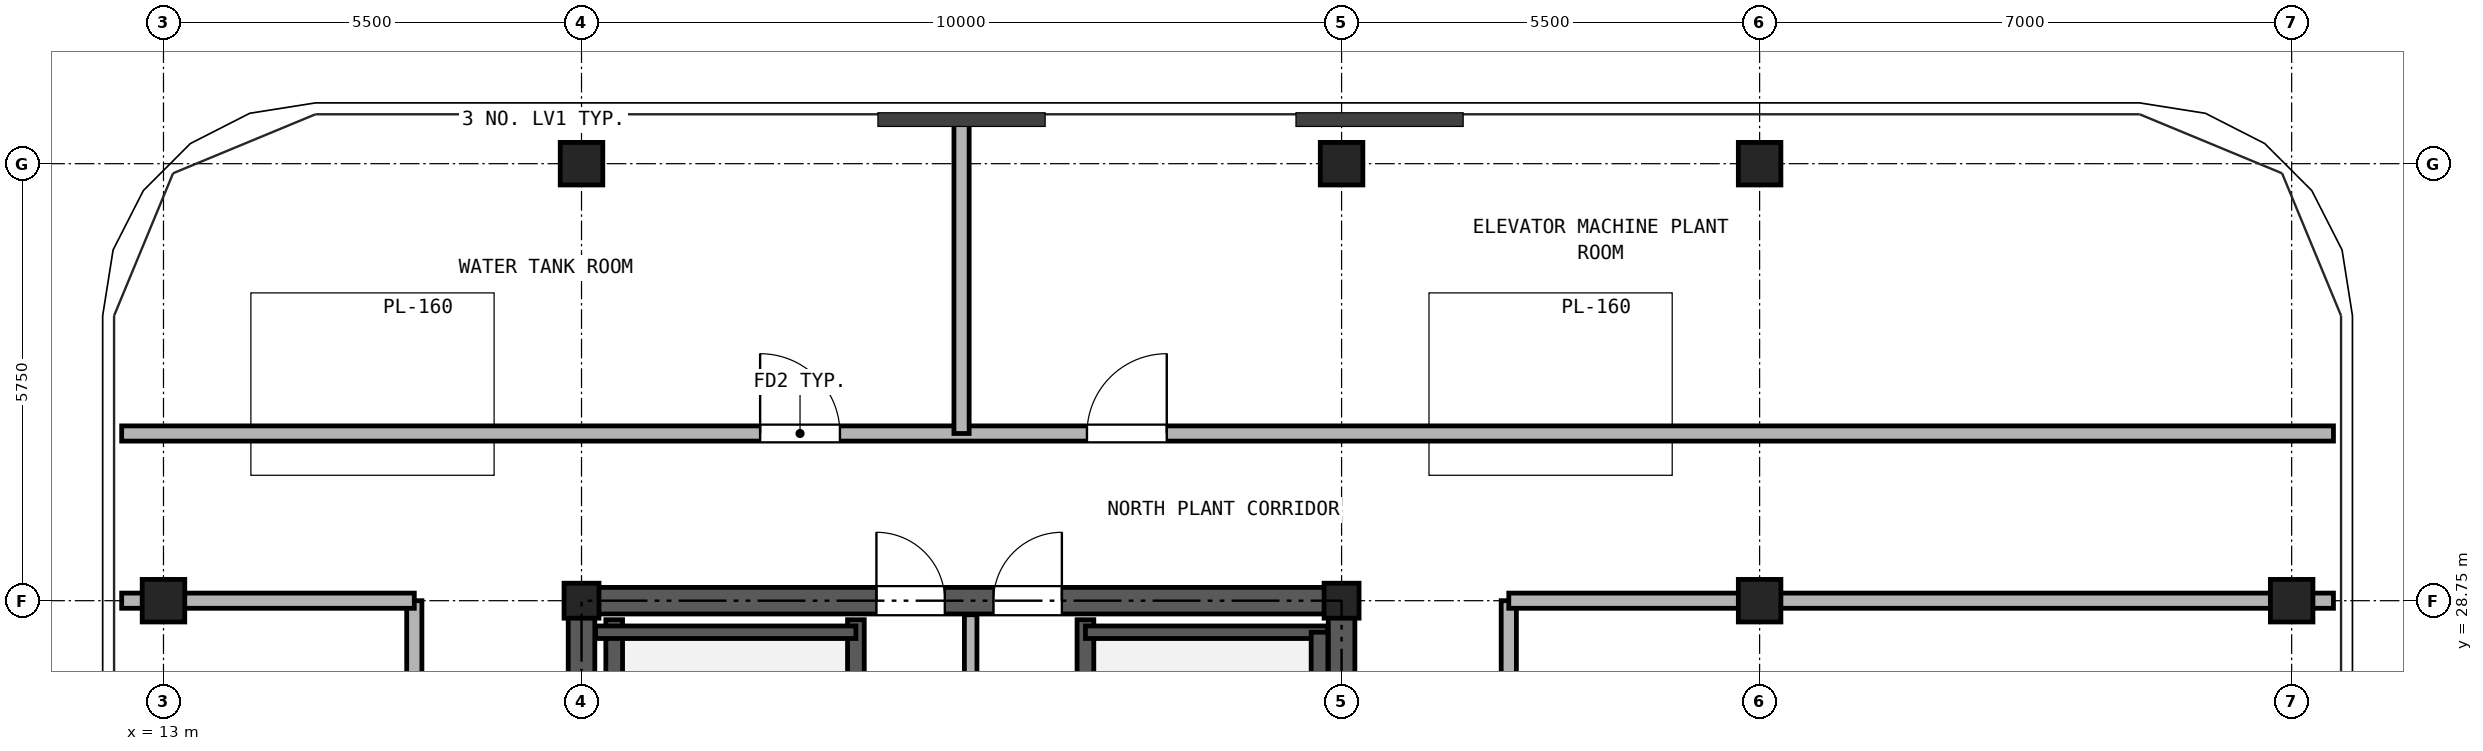
"""IFC4 building model, lengths in metres.
Left out: names, types, materials, properties, quantities, classifications, styles, units other than length and angle.
Written with IfcOpenShell. Run it as: python <this file> out.ifc"""

import sys

from ifc_helpers import new_model, si_unit, direction, frame, frame_2d, origin, origin_2d, place, context, subcontext, project, spatial, rectangle, hollow_rectangle, extrude, source, transform, mapped, element, fill, save


model = new_model("IFC4")
c1 = context("Model", 3, precision=1e-05, world=origin(), true_north=direction((0.0, 1.0)))
c2 = subcontext(c1, "Body", "Model", "MODEL_VIEW")
j1 = project(units=[si_unit("LENGTHUNIT", "METRE"), si_unit("PLANEANGLEUNIT", "RADIAN")], contexts=[c1])
p1 = place(None, origin())
s1 = spatial("IfcSite", under=j1, at=p1, CompositionType="ELEMENT")
p2 = place(p1, origin())
s2 = spatial("IfcBuilding", under=s1, at=p2, CompositionType="ELEMENT")
p3 = place(p2, frame((0.0, 0.0, 282.1)))
s3 = spatial("IfcBuildingStorey", under=s2, at=p3, CompositionType="ELEMENT", Elevation=282.1)
m1 = source(origin(), c2, "Body", "SweptSolid", [
    extrude(hollow_rectangle(XDim=0.56, YDim=0.56, WallThickness=0.03, at=origin_2d()), origin(), (0.0, 0.0, 1.0), 3.38),
])
for number, where, z_axis, x_axis in (
    (1, (18.5, 34.5, 0.0), (0.0, 0.0, 1.0), (1.0, 0.0, 0.0)),
    (2, (28.5, 34.5, 0.0), (0.0, 0.0, 1.0), (1.0, 0.0, 0.0)),
    (3, (34.0, 34.5, 0.0), (0.0, 0.0, 1.0), (1.0, 0.0, 0.0)),
    (4, (13.0, 28.75, 0.0), (0.0, 0.0, 1.0), (1.0, 0.0, 0.0)),
    (5, (41.0, 28.75, 0.0), (0.0, 0.0, 1.0), (1.0, 0.0, 0.0)),
):
    element("IfcColumn", number, at=place(p3, frame(where, z_axis=z_axis, x_axis=x_axis)), inside=s3, PredefinedType="COLUMN", context=c2, shape_type="MappedRepresentation", body=[
        mapped(m1, transform((0.0, 0.0, 0.0), x_axis=(1.0, 0.0, 0.0), y_axis=(0.0, 1.0, 0.0), z_axis=(0.0, 0.0, 1.0), scale=1.0)),
    ])
m2 = source(origin(), c2, "Body", "SweptSolid", [
    extrude(hollow_rectangle(XDim=0.46, YDim=0.46, WallThickness=0.025, at=origin_2d()), origin(), (0.0, 0.0, 1.0), 3.38),
])
for number, where, z_axis, x_axis in (
    (6, (18.5, 28.75, 0.0), (0.0, 0.0, 1.0), (1.0, 0.0, 0.0)),
    (7, (28.5, 28.75, 0.0), (0.0, 0.0, 1.0), (1.0, 0.0, 0.0)),
):
    element("IfcColumn", number, at=place(p3, frame(where, z_axis=z_axis, x_axis=x_axis)), inside=s3, PredefinedType="COLUMN", context=c2, shape_type="MappedRepresentation", body=[
        mapped(m2, transform((0.0, 0.0, 0.0), x_axis=(1.0, 0.0, 0.0), y_axis=(0.0, 1.0, 0.0), z_axis=(0.0, 0.0, 1.0), scale=1.0)),
    ])
p4 = place(p3, frame((34.0, 28.75, 0.0), z_axis=(0.0, 0.0, 1.0), x_axis=(1.0, 0.0, 0.0)))
e8 = element("IfcColumn", 8, at=p4, inside=s3, PredefinedType="COLUMN", context=c2, shape_type="MappedRepresentation", body=[
    mapped(m1, transform((0.0, 0.0, 0.0), x_axis=(1.0, 0.0, 0.0), y_axis=(0.0, 1.0, 0.0), z_axis=(0.0, 0.0, 1.0), scale=1.0)),
])
p5 = place(p3, frame((18.325, 28.75, 0.0), z_axis=(0.0, 0.0, 1.0), x_axis=(1.0, 0.0, 0.0)))
e9 = element("IfcWall", 9, at=p5, inside=s3, PredefinedType="SHEAR", context=c2, shape_type="SweptSolid", body=[
    extrude(rectangle(XDim=10.35, YDim=0.35, at=frame_2d((5.175, 0.0))), origin(), (0.0, 0.0, 1.0), 3.38),
])
p6 = place(p5, frame((4.055, 0.0, 0.0)))
e10 = element("IfcOpeningElement", 10, at=p6, cuts=e9, PredefinedType="OPENING", context=c2, shape_type="SweptSolid", body=[
    extrude(rectangle(XDim=0.9, YDim=2.05, at=frame_2d((0.45, 1.025))), frame((0.0, 0.185, 0.0), z_axis=(0.0, -1.0, 0.0), x_axis=(1.0, 0.0, 0.0)), (0.0, 0.0, 1.0), 0.37),
])
p7 = place(p5, frame((5.595, 0.0, 0.0)))
e11 = element("IfcOpeningElement", 11, at=p7, cuts=e9, PredefinedType="OPENING", context=c2, shape_type="SweptSolid", body=[
    extrude(rectangle(XDim=0.9, YDim=2.05, at=frame_2d((0.45, 1.025))), frame((0.0, 0.185, 0.0), z_axis=(0.0, -1.0, 0.0), x_axis=(1.0, 0.0, 0.0)), (0.0, 0.0, 1.0), 0.37),
])
p8 = place(p3, frame((18.5, 11.675, 0.0), z_axis=(0.0, 0.0, 1.0), x_axis=(0.0, 1.0, 0.0)))
e12 = element("IfcWall", 12, at=p8, inside=s3, PredefinedType="SHEAR", context=c2, shape_type="SweptSolid", body=[
    extrude(rectangle(XDim=16.9, YDim=0.35, at=frame_2d((8.45, 0.0))), origin(), (0.0, 0.0, 1.0), 3.38),
])
p9 = place(p8, frame((7.475, 0.0, 0.0)))
e13 = element("IfcOpeningElement", 13, at=p9, cuts=e12, PredefinedType="OPENING", context=c2, shape_type="SweptSolid", body=[
    extrude(rectangle(XDim=1.15, YDim=2.2, at=frame_2d((0.575, 1.1))), frame((0.0, 0.185, 0.0), z_axis=(0.0, -1.0, 0.0), x_axis=(1.0, 0.0, 0.0)), (0.0, 0.0, 1.0), 0.37),
])
p10 = place(p3, frame((28.5, 11.675, 0.0), z_axis=(0.0, 0.0, 1.0), x_axis=(0.0, 1.0, 0.0)))
e14 = element("IfcWall", 14, at=p10, inside=s3, PredefinedType="SHEAR", context=c2, shape_type="SweptSolid", body=[
    extrude(rectangle(XDim=16.9, YDim=0.35, at=frame_2d((8.45, 0.0))), origin(), (0.0, 0.0, 1.0), 3.38),
])
p11 = place(p10, frame((7.475, 0.0, 0.0)))
e15 = element("IfcOpeningElement", 15, at=p11, cuts=e14, PredefinedType="OPENING", context=c2, shape_type="SweptSolid", body=[
    extrude(rectangle(XDim=1.15, YDim=2.2, at=frame_2d((0.575, 1.1))), frame((0.0, 0.185, 0.0), z_axis=(0.0, -1.0, 0.0), x_axis=(1.0, 0.0, 0.0)), (0.0, 0.0, 1.0), 0.37),
])
for number, where, z_axis, x_axis in (
    (16, (18.93, 21.39, 0.0), (0.0, 0.0, 1.0), (0.0, 1.0, 0.0)),
    (17, (22.11, 21.39, 0.0), (0.0, 0.0, 1.0), (0.0, 1.0, 0.0)),
    (18, (25.13, 21.39, 0.0), (0.0, 0.0, 1.0), (0.0, 1.0, 0.0)),
):
    element("IfcWall", number, at=place(p3, frame(where, z_axis=z_axis, x_axis=x_axis)), inside=s3, PredefinedType="SOLIDWALL", context=c2, shape_type="SweptSolid", body=[
        extrude(rectangle(XDim=7.11, YDim=0.22, at=frame_2d((3.555, 0.0))), origin(), (0.0, 0.0, 1.0), 3.38),
    ])
p12 = place(p3, frame((18.685, 28.335, 0.0), z_axis=(0.0, 0.0, 1.0), x_axis=(1.0, 0.0, 0.0)))
e19 = element("IfcWall", 19, at=p12, inside=s3, PredefinedType="PARTITIONING", context=c2, shape_type="SweptSolid", body=[
    extrude(rectangle(XDim=3.425, YDim=0.165, at=frame_2d((1.712, 0.0))), origin(), (0.0, 0.0, 1.0), 3.38),
])
p13 = place(p3, frame((25.13, 28.335, 0.0), z_axis=(0.0, 0.0, 1.0), x_axis=(1.0, 0.0, 0.0)))
e20 = element("IfcWall", 20, at=p13, inside=s3, PredefinedType="PARTITIONING", context=c2, shape_type="SweptSolid", body=[
    extrude(rectangle(XDim=3.185, YDim=0.165, at=frame_2d((1.593, 0.0))), origin(), (0.0, 0.0, 1.0), 3.38),
])
p14 = place(p3, frame((28.21, 21.39, 0.0), z_axis=(0.0, 0.0, 1.0), x_axis=(0.0, 1.0, 0.0)))
e21 = element("IfcWall", 21, at=p14, inside=s3, PredefinedType="SOLIDWALL", context=c2, shape_type="SweptSolid", body=[
    extrude(rectangle(XDim=6.945, YDim=0.22, at=frame_2d((3.473, 0.0))), origin(), (0.0, 0.0, 1.0), 3.38),
])
p15 = place(p3, frame((23.62, 24.4, 0.0), z_axis=(0.0, 0.0, 1.0), x_axis=(0.0, 1.0, 0.0)))
e22 = element("IfcWall", 22, at=p15, inside=s3, PredefinedType="PARTITIONING", context=c2, shape_type="SweptSolid", body=[
    extrude(rectangle(XDim=4.165, YDim=0.165, at=frame_2d((2.083, 0.0))), origin(), (0.0, 0.0, 1.0), 3.38),
])
p16 = place(p3, frame((12.45, 30.95, 0.0), z_axis=(0.0, 0.0, 1.0), x_axis=(1.0, 0.0, 0.0)))
e23 = element("IfcWall", 23, at=p16, inside=s3, PredefinedType="PARTITIONING", context=c2, shape_type="SweptSolid", body=[
    extrude(rectangle(XDim=29.1, YDim=0.2, at=frame_2d((14.55, 0.0))), origin(), (0.0, 0.0, 1.0), 3.38),
])
p17 = place(p16, frame((8.4, 0.0, 0.0)))
e24 = element("IfcOpeningElement", 24, at=p17, cuts=e23, PredefinedType="OPENING", context=c2, shape_type="SweptSolid", body=[
    extrude(rectangle(XDim=1.05, YDim=2.15, at=frame_2d((0.525, 1.075))), frame((0.0, 0.11, 0.0), z_axis=(0.0, -1.0, 0.0), x_axis=(1.0, 0.0, 0.0)), (0.0, 0.0, 1.0), 0.22),
])
p18 = place(p16, frame((12.7, 0.0, 0.0)))
e25 = element("IfcOpeningElement", 25, at=p18, cuts=e23, PredefinedType="OPENING", context=c2, shape_type="SweptSolid", body=[
    extrude(rectangle(XDim=1.05, YDim=2.15, at=frame_2d((0.525, 1.075))), frame((0.0, 0.11, 0.0), z_axis=(0.0, -1.0, 0.0), x_axis=(1.0, 0.0, 0.0)), (0.0, 0.0, 1.0), 0.22),
])
p19 = place(p3, frame((16.3, 8.9, 0.0), z_axis=(0.0, 0.0, 1.0), x_axis=(0.0, 1.0, 0.0)))
e26 = element("IfcWall", 26, at=p19, inside=s3, PredefinedType="PARTITIONING", context=c2, shape_type="SweptSolid", body=[
    extrude(rectangle(XDim=19.85, YDim=0.2, at=frame_2d((9.925, 0.0))), origin(), (0.0, 0.0, 1.0), 3.38),
])
p20 = place(p19, frame((4.55, 0.0, 0.0)))
e27 = element("IfcOpeningElement", 27, at=p20, cuts=e26, PredefinedType="OPENING", context=c2, shape_type="SweptSolid", body=[
    extrude(rectangle(XDim=1.05, YDim=2.15, at=frame_2d((0.525, 1.075))), frame((0.0, 0.11, 0.0), z_axis=(0.0, -1.0, 0.0), x_axis=(1.0, 0.0, 0.0)), (0.0, 0.0, 1.0), 0.22),
])
p21 = place(p19, frame((14.475, 0.0, 0.0)))
e28 = element("IfcOpeningElement", 28, at=p21, cuts=e26, PredefinedType="OPENING", context=c2, shape_type="SweptSolid", body=[
    extrude(rectangle(XDim=1.05, YDim=2.15, at=frame_2d((0.525, 1.075))), frame((0.0, 0.11, 0.0), z_axis=(0.0, -1.0, 0.0), x_axis=(1.0, 0.0, 0.0)), (0.0, 0.0, 1.0), 0.22),
])
p22 = place(p3, frame((30.7, 8.9, 0.0), z_axis=(0.0, 0.0, 1.0), x_axis=(0.0, 1.0, 0.0)))
e29 = element("IfcWall", 29, at=p22, inside=s3, PredefinedType="PARTITIONING", context=c2, shape_type="SweptSolid", body=[
    extrude(rectangle(XDim=19.85, YDim=0.2, at=frame_2d((9.925, 0.0))), origin(), (0.0, 0.0, 1.0), 3.38),
])
p23 = place(p22, frame((9.425, 0.0, 0.0)))
e30 = element("IfcOpeningElement", 30, at=p23, cuts=e29, PredefinedType="OPENING", context=c2, shape_type="SweptSolid", body=[
    extrude(rectangle(XDim=1.05, YDim=2.15, at=frame_2d((0.525, 1.075))), frame((0.0, 0.11, 0.0), z_axis=(0.0, -1.0, 0.0), x_axis=(1.0, 0.0, 0.0)), (0.0, 0.0, 1.0), 0.22),
])
p24 = place(p3, frame((12.45, 28.75, 0.0), z_axis=(0.0, 0.0, 1.0), x_axis=(1.0, 0.0, 0.0)))
e31 = element("IfcWall", 31, at=p24, inside=s3, PredefinedType="PARTITIONING", context=c2, shape_type="SweptSolid", body=[
    extrude(rectangle(XDim=3.85, YDim=0.2, at=frame_2d((1.925, 0.0))), origin(), (0.0, 0.0, 1.0), 2.905),
])
p25 = place(p3, frame((30.7, 28.75, 0.0), z_axis=(0.0, 0.0, 1.0), x_axis=(1.0, 0.0, 0.0)))
e32 = element("IfcWall", 32, at=p25, inside=s3, PredefinedType="PARTITIONING", context=c2, shape_type="SweptSolid", body=[
    extrude(rectangle(XDim=10.85, YDim=0.2, at=frame_2d((5.425, 0.0))), origin(), (0.0, 0.0, 1.0), 2.905),
])
p26 = place(p3, frame((23.5, 30.95, 0.0), z_axis=(0.0, 0.0, 1.0), x_axis=(0.0, 1.0, 0.0)))
e33 = element("IfcWall", 33, at=p26, inside=s3, PredefinedType="PARTITIONING", context=c2, shape_type="SweptSolid", body=[
    extrude(rectangle(XDim=4.1, YDim=0.2, at=frame_2d((2.05, 0.0))), origin(), (0.0, 0.0, 1.0), 3.38),
])
p27 = place(p6, origin())
e34 = element("IfcDoor", 34, at=p27, inside=s3, OperationType="SINGLE_SWING_LEFT", PredefinedType="DOOR", context=c2, shape_type="SweptSolid", body=[
    extrude(rectangle(XDim=0.9, YDim=2.05, at=frame_2d((0.45, 1.025))), frame((0.0, 0.025, 0.0), z_axis=(0.0, -1.0, 0.0), x_axis=(1.0, 0.0, 0.0)), (0.0, 0.0, 1.0), 0.05),
])
fill(e10, e34)
p28 = place(p7, origin())
e35 = element("IfcDoor", 35, at=p28, inside=s3, OperationType="SINGLE_SWING_RIGHT", PredefinedType="DOOR", context=c2, shape_type="SweptSolid", body=[
    extrude(rectangle(XDim=0.9, YDim=2.05, at=frame_2d((0.45, 1.025))), frame((0.0, 0.025, 0.0), z_axis=(0.0, -1.0, 0.0), x_axis=(1.0, 0.0, 0.0)), (0.0, 0.0, 1.0), 0.05),
])
fill(e11, e35)
p29 = place(p17, origin())
e36 = element("IfcDoor", 36, at=p29, inside=s3, OperationType="SINGLE_SWING_LEFT", PredefinedType="DOOR", context=c2, shape_type="SweptSolid", body=[
    extrude(rectangle(XDim=1.05, YDim=2.15, at=frame_2d((0.525, 1.075))), frame((0.0, 0.025, 0.0), z_axis=(0.0, -1.0, 0.0), x_axis=(1.0, 0.0, 0.0)), (0.0, 0.0, 1.0), 0.05),
])
fill(e24, e36)
p30 = place(p18, origin())
e37 = element("IfcDoor", 37, at=p30, inside=s3, OperationType="SINGLE_SWING_RIGHT", PredefinedType="DOOR", context=c2, shape_type="SweptSolid", body=[
    extrude(rectangle(XDim=1.05, YDim=2.15, at=frame_2d((0.525, 1.075))), frame((0.0, 0.025, 0.0), z_axis=(0.0, -1.0, 0.0), x_axis=(1.0, 0.0, 0.0)), (0.0, 0.0, 1.0), 0.05),
])
fill(e25, e37)
save(model, sys.argv[1])
